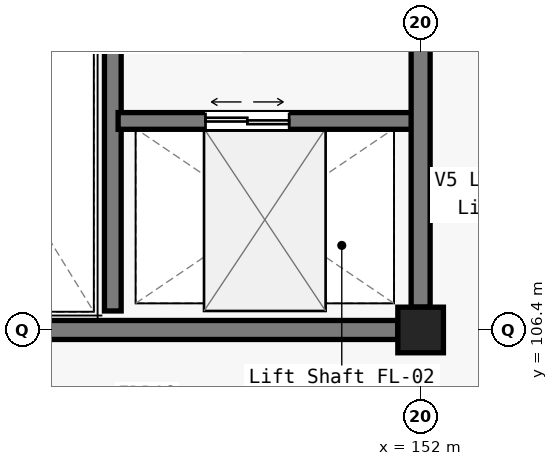
"""IFC4 building model, lengths in metres.
Left out: names, types, materials, properties, quantities, classifications, styles, units other than length and angle.
Written with IfcOpenShell. Run it as: python <this file> out.ifc"""

import sys

from ifc_helpers import new_model, si_unit, direction, frame, frame_2d, origin, origin_2d, place, context, subcontext, project, spatial, rectangle, extrude, element, fill, save


model = new_model("IFC4")
c1 = context("Model", 3, precision=1e-05, world=origin(), true_north=direction((0.0, 1.0)))
c2 = subcontext(c1, "Body", "Model", "MODEL_VIEW")
j1 = project(units=[si_unit("LENGTHUNIT", "METRE"), si_unit("PLANEANGLEUNIT", "RADIAN")], contexts=[c1])
p1 = place(None, origin())
s1 = spatial("IfcSite", under=j1, at=p1, CompositionType="ELEMENT")
p2 = place(p1, origin())
s2 = spatial("IfcBuilding", under=s1, at=p2, CompositionType="ELEMENT")
p3 = place(p2, frame((0.0, 0.0, 24.6)))
s3 = spatial("IfcBuildingStorey", under=s2, at=p3, CompositionType="ELEMENT", Elevation=24.6)
p4 = place(p3, frame((152.0, 106.4, 0.0), z_axis=(0.0, 0.0, 1.0), x_axis=(1.0, 0.0, 0.0)))
e1 = element("IfcColumn", 1, at=p4, inside=s3, PredefinedType="COLUMN", context=c2, shape_type="SweptSolid", body=[
    extrude(rectangle(XDim=0.6, YDim=0.6, at=origin_2d()), origin(), (0.0, 0.0, 1.0), 4.8),
])
p5 = place(p3, frame((144.25, 106.4, 0.0), z_axis=(0.0, 0.0, 1.0), x_axis=(1.0, 0.0, 0.0)))
e2 = element("IfcWall", 2, at=p5, inside=s3, PredefinedType="SOLIDWALL", context=c2, shape_type="SweptSolid", body=[
    extrude(rectangle(XDim=7.45, YDim=0.25, at=frame_2d((3.725, 0.0))), origin(), (0.0, 0.0, 1.0), 3.9),
])
p6 = place(p3, frame((147.95, 106.65, 0.0), z_axis=(0.0, 0.0, 1.0), x_axis=(0.0, 1.0, 0.0)))
e3 = element("IfcWall", 3, at=p6, inside=s3, PredefinedType="SOLIDWALL", context=c2, shape_type="SweptSolid", body=[
    extrude(rectangle(XDim=7.1, YDim=0.22, at=frame_2d((3.55, 0.0))), origin(), (0.0, 0.0, 1.0), 4.55),
])
p7 = place(p6, frame((5.55, 0.0, 0.0)))
e4 = element("IfcOpeningElement", 4, at=p7, cuts=e3, PredefinedType="OPENING", context=c2, shape_type="SweptSolid", body=[
    extrude(rectangle(XDim=1.2, YDim=2.15, at=frame_2d((0.6, 1.075))), frame((0.0, 0.12, 0.0), z_axis=(0.0, -1.0, 0.0), x_axis=(1.0, 0.0, 0.0)), (0.0, 0.0, 1.0), 0.24),
])
p8 = place(p3, frame((148.02, 109.15, 0.0), z_axis=(0.0, 0.0, 1.0), x_axis=(1.0, 0.0, 0.0)))
e5 = element("IfcWall", 5, at=p8, inside=s3, PredefinedType="SOLIDWALL", context=c2, shape_type="SweptSolid", body=[
    extrude(rectangle(XDim=3.93, YDim=0.22, at=frame_2d((1.965, 0.0))), origin(), (0.0, 0.0, 1.0), 3.9),
])
p9 = place(p8, frame((1.15, 0.0, 0.0)))
e6 = element("IfcOpeningElement", 6, at=p9, cuts=e5, PredefinedType="OPENING", context=c2, shape_type="SweptSolid", body=[
    extrude(rectangle(XDim=1.1, YDim=2.2, at=frame_2d((0.55, 1.1))), frame((0.0, 0.12, 0.0), z_axis=(0.0, -1.0, 0.0), x_axis=(1.0, 0.0, 0.0)), (0.0, 0.0, 1.0), 0.24),
])
p10 = place(p3, frame((152.0, 106.7, 0.0), z_axis=(0.0, 0.0, 1.0), x_axis=(0.0, 1.0, 0.0)))
e7 = element("IfcWall", 7, at=p10, inside=s3, PredefinedType="SOLIDWALL", context=c2, shape_type="SweptSolid", body=[
    extrude(rectangle(XDim=7.05, YDim=0.25, at=frame_2d((3.525, 0.0))), origin(), (0.0, 0.0, 1.0), 3.9),
])
p11 = place(p10, frame((3.55, 0.0, 0.0)))
e8 = element("IfcOpeningElement", 8, at=p11, cuts=e7, PredefinedType="OPENING", context=c2, shape_type="SweptSolid", body=[
    extrude(rectangle(XDim=1.35, YDim=2.2, at=frame_2d((0.675, 1.1))), frame((0.0, 0.135, 0.0), z_axis=(0.0, -1.0, 0.0), x_axis=(1.0, 0.0, 0.0)), (0.0, 0.0, 1.0), 0.27),
])
p12 = place(p9, origin())
e9 = element("IfcDoor", 9, at=p12, inside=s3, OperationType="DOUBLE_DOOR_SLIDING", PredefinedType="DOOR", context=c2, shape_type="SweptSolid", body=[
    extrude(rectangle(XDim=1.1, YDim=2.2, at=frame_2d((0.55, 1.1))), frame((0.0, 0.025, 0.0), z_axis=(0.0, -1.0, 0.0), x_axis=(1.0, 0.0, 0.0)), (0.0, 0.0, 1.0), 0.05),
])
fill(e6, e9)
save(model, sys.argv[1])
